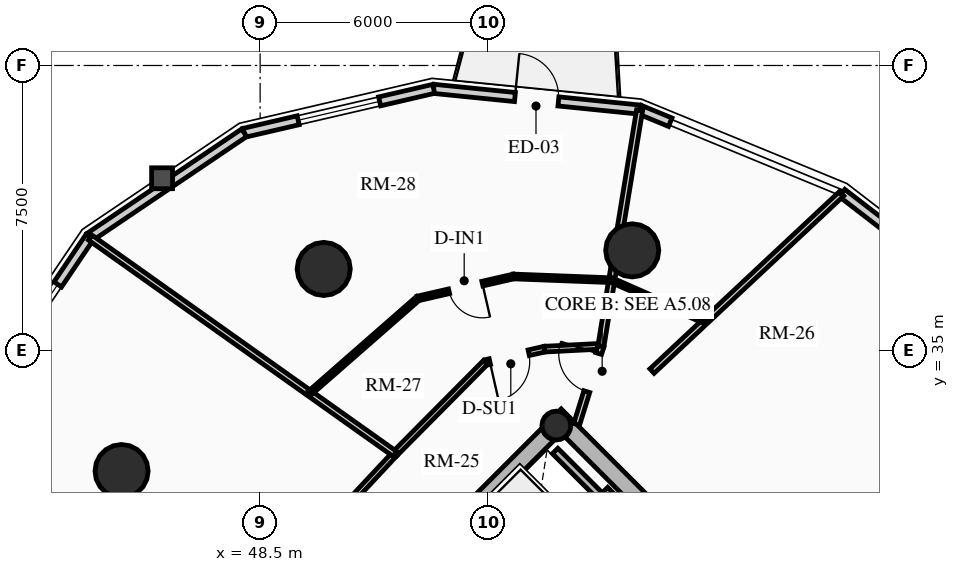
"""IFC4 building model, lengths in metres.
Left out: names, types, materials, properties, quantities, classifications, styles, units other than length and angle.
Written with IfcOpenShell. Run it as: python <this file> out.ifc"""

import sys

from ifc_helpers import new_model, si_unit, direction, frame, frame_2d, origin, origin_2d, place, context, subcontext, project, spatial, rectangle, circle, hollow_circle, extrude, source, transform, mapped, element, fill, save


model = new_model("IFC4")
c1 = context("Model", 3, precision=1e-05, world=origin(), true_north=direction((0.0, 1.0)))
c2 = subcontext(c1, "Body", "Model", "MODEL_VIEW")
j1 = project(units=[si_unit("LENGTHUNIT", "METRE"), si_unit("PLANEANGLEUNIT", "RADIAN")], contexts=[c1])
p1 = place(None, origin())
s1 = spatial("IfcSite", under=j1, at=p1, CompositionType="ELEMENT")
p2 = place(p1, origin())
s2 = spatial("IfcBuilding", under=s1, at=p2, CompositionType="ELEMENT")
p3 = place(p2, frame((0.0, 0.0, 105.07)))
s3 = spatial("IfcBuildingStorey", under=s2, at=p3, CompositionType="ELEMENT", Elevation=105.07)
p4 = place(p3, frame((66.303, 23.263, 0.0), z_axis=(0.0, 0.0, 1.0), x_axis=(-0.707106781187, 0.707106781187, 0.0)))
e1 = element("IfcWall", 1, at=p4, inside=s3, PredefinedType="SHEAR", context=c2, shape_type="SweptSolid", body=[
    extrude(rectangle(XDim=14.2, YDim=0.45, at=frame_2d((7.1, 0.0))), origin(), (0.0, 0.0, 1.0), 2.91),
])
p5 = place(p3, frame((48.856, 25.578, 0.0), z_axis=(0.0, 0.0, 1.0), x_axis=(0.707106781187, 0.707106781187, 0.0)))
e2 = element("IfcWall", 2, at=p5, inside=s3, PredefinedType="SHEAR", context=c2, shape_type="SweptSolid", body=[
    extrude(rectangle(XDim=10.7, YDim=0.45, at=frame_2d((5.35, 0.0))), origin(), (0.0, 0.0, 1.0), 2.91),
])
m1 = source(origin(), c2, "Body", "SweptSolid", [
    extrude(rectangle(XDim=1.5, YDim=2.02, at=frame_2d((0.75, 1.01))), frame((0.0, 0.235, 0.0), z_axis=(0.0, -1.0, 0.0), x_axis=(1.0, 0.0, 0.0)), (0.0, 0.0, 1.0), 0.47),
])
p6 = place(p5, frame((4.6, 0.0, 0.0)))
e3 = element("IfcOpeningElement", 3, at=p6, cuts=e2, PredefinedType="OPENING", context=c2, shape_type="MappedRepresentation", body=[
    mapped(m1, transform((0.0, 0.0, 0.0), x_axis=(1.0, 0.0, 0.0), y_axis=(0.0, 1.0, 0.0), z_axis=(0.0, 0.0, 1.0), scale=1.0)),
])
p7 = place(p3, frame((56.294, 33.024, 0.0), z_axis=(0.0, 0.0, 1.0), x_axis=(0.707106781187, 0.707106781187, 0.0)))
e4 = element("IfcColumn", 4, at=p7, inside=s3, PredefinedType="COLUMN", context=c2, shape_type="SweptSolid", body=[
    extrude(hollow_circle(Radius=0.38, WallThickness=0.032, at=origin_2d()), origin(), (0.0, 0.0, 1.0), 2.91),
])
for number, where, z_axis, x_axis in (
    (5, (58.291, 37.635, 0.0), (0.0, 0.0, 1.0), (1.0, 0.0, 0.0)),
    (6, (50.173, 37.146, 0.0), (0.0, 0.0, 1.0), (1.0, 0.0, 0.0)),
    (7, (44.854, 31.827, 0.0), (0.0, 0.0, 1.0), (1.0, 0.0, 0.0)),
):
    element("IfcColumn", number, at=place(p3, frame(where, z_axis=z_axis, x_axis=x_axis)), inside=s3, PredefinedType="USERDEFINED", context=c2, shape_type="SweptSolid", body=[
        extrude(circle(Radius=0.7, at=origin_2d()), origin(), (0.0, 0.0, 1.0), 2.91),
    ])
p8 = place(p3, frame((63.811, 39.145, 0.0), z_axis=(0.0, 0.0, 1.0), x_axis=(0.791982052206, -0.61054437102, 0.0)))
e8 = element("IfcWall", 8, at=p8, inside=s3, PredefinedType="SOLIDWALL", context=c2, shape_type="SweptSolid", body=[
    extrude(rectangle(XDim=5.942, YDim=0.24, at=frame_2d((2.971, 0.0))), origin(), (0.0, 0.0, 1.0), 2.179),
])
p9 = place(p3, frame((58.487, 41.339, 0.0), z_axis=(0.0, 0.0, 1.0), x_axis=(0.924556017656, -0.381046152345, 0.0)))
e9 = element("IfcWall", 9, at=p9, inside=s3, PredefinedType="SOLIDWALL", context=c2, shape_type="SweptSolid", body=[
    extrude(rectangle(XDim=0.87, YDim=0.24, at=frame_2d((0.435, 0.0))), origin(), (0.0, 0.0, 1.0), 2.179),
])
p10 = place(p3, frame((53.067, 41.885, 0.0), z_axis=(0.0, 0.0, 1.0), x_axis=(0.994971754311, -0.10015591906, 0.0)))
e10 = element("IfcWall", 10, at=p10, inside=s3, PredefinedType="SOLIDWALL", context=c2, shape_type="SweptSolid", body=[
    extrude(rectangle(XDim=5.448, YDim=0.24, at=frame_2d((2.724, 0.0))), origin(), (0.0, 0.0, 1.0), 2.179),
])
m2 = source(origin(), c2, "Body", "SweptSolid", [
    extrude(rectangle(XDim=1.15, YDim=2.005, at=frame_2d((0.575, 1.002))), frame((0.0, 0.13, 0.0), z_axis=(0.0, -1.0, 0.0), x_axis=(1.0, 0.0, 0.0)), (0.0, 0.0, 1.0), 0.26),
])
p11 = place(p10, frame((2.149, 0.0, 0.0)))
e11 = element("IfcOpeningElement", 11, at=p11, cuts=e10, PredefinedType="OPENING", context=c2, shape_type="MappedRepresentation", body=[
    mapped(m2, transform((0.0, 0.0, 0.0), x_axis=(1.0, 0.0, 0.0), y_axis=(0.0, 1.0, 0.0), z_axis=(0.0, 0.0, 1.0), scale=1.0)),
])
p12 = place(p3, frame((48.08, 40.729, 0.0), z_axis=(0.0, 0.0, 1.0), x_axis=(0.974165631126, 0.225834725257, 0.0)))
e12 = element("IfcWall", 12, at=p12, inside=s3, PredefinedType="SOLIDWALL", context=c2, shape_type="SweptSolid", body=[
    extrude(rectangle(XDim=5.119, YDim=0.24, at=frame_2d((2.56, 0.0))), origin(), (0.0, 0.0, 1.0), 2.179),
])
m3 = source(origin(), c2, "Body", "SweptSolid", [
    extrude(rectangle(XDim=2.2, YDim=1.35, at=frame_2d((1.1, 0.675))), frame((0.0, 0.13, 0.0), z_axis=(0.0, -1.0, 0.0), x_axis=(1.0, 0.0, 0.0)), (0.0, 0.0, 1.0), 0.26),
])
p13 = place(p12, frame((1.459, 0.0, 0.65)))
e13 = element("IfcOpeningElement", 13, at=p13, cuts=e12, PredefinedType="OPENING", context=c2, shape_type="MappedRepresentation", body=[
    mapped(m3, transform((0.0, 0.0, 0.0), x_axis=(1.0, 0.0, 0.0), y_axis=(0.0, 1.0, 0.0), z_axis=(0.0, 0.0, 1.0), scale=1.0)),
])
p14 = place(p3, frame((44.015, 37.985, 0.0), z_axis=(0.0, 0.0, 1.0), x_axis=(0.828781148131, 0.559572880421, 0.0)))
e14 = element("IfcWall", 14, at=p14, inside=s3, PredefinedType="SOLIDWALL", context=c2, shape_type="SweptSolid", body=[
    extrude(rectangle(XDim=4.905, YDim=0.24, at=frame_2d((2.452, 0.0))), origin(), (0.0, 0.0, 1.0), 2.179),
])
p15 = place(p3, frame((41.271, 33.92, 0.0), z_axis=(0.0, 0.0, 1.0), x_axis=(0.559572880421, 0.828781148131, 0.0)))
e15 = element("IfcWall", 15, at=p15, inside=s3, PredefinedType="SOLIDWALL", context=c2, shape_type="SweptSolid", body=[
    extrude(rectangle(XDim=4.905, YDim=0.24, at=frame_2d((2.452, 0.0))), origin(), (0.0, 0.0, 1.0), 2.179),
])
m4 = source(origin(), c2, "Body", "SweptSolid", [
    extrude(rectangle(XDim=1.9, YDim=1.35, at=frame_2d((0.95, 0.675))), frame((0.0, 0.13, 0.0), z_axis=(0.0, -1.0, 0.0), x_axis=(1.0, 0.0, 0.0)), (0.0, 0.0, 1.0), 0.26),
])
p16 = place(p15, frame((1.502, 0.0, 0.65)))
e16 = element("IfcOpeningElement", 16, at=p16, cuts=e15, PredefinedType="OPENING", context=c2, shape_type="MappedRepresentation", body=[
    mapped(m4, transform((0.0, 0.0, 0.0), x_axis=(1.0, 0.0, 0.0), y_axis=(0.0, 1.0, 0.0), z_axis=(0.0, 0.0, 1.0), scale=1.0)),
])
p17 = place(p3, frame((55.615, 29.227, 0.0), z_axis=(0.0, 0.0, 1.0), x_axis=(0.707147878904, 0.70706568108, 0.0)))
e17 = element("IfcWall", 17, at=p17, inside=s3, PredefinedType="SHEAR", context=c2, shape_type="SweptSolid", body=[
    extrude(rectangle(XDim=2.97, YDim=0.2, at=frame_2d((1.485, 0.0))), origin(), (0.0, 0.0, 1.0), 2.91),
])
p18 = place(p3, frame((57.419, 31.2, 0.0), z_axis=(0.0, 0.0, 1.0), x_axis=(-0.707032117043, 0.707181437447, 0.0)))
e18 = element("IfcWall", 18, at=p18, inside=s3, PredefinedType="SHEAR", context=c2, shape_type="SweptSolid", body=[
    extrude(rectangle(XDim=1.635, YDim=0.2, at=frame_2d((0.817, 0.0))), origin(), (0.0, 0.0, 1.0), 2.91),
])
p19 = place(p3, frame((57.467, 35.111, 0.0), z_axis=(0.0, 0.0, 1.0), x_axis=(-0.998691757323, -0.051134859488, 0.0)))
e19 = element("IfcWall", 19, at=p19, inside=s3, PredefinedType="PARTITIONING", context=c2, shape_type="SweptSolid", body=[
    extrude(rectangle(XDim=1.485, YDim=0.15, at=frame_2d((0.742, 0.0))), origin(), (0.0, 0.0, 1.0), 2.225),
])
p20 = place(p3, frame((55.984, 35.035, 0.0), z_axis=(0.0, 0.0, 1.0), x_axis=(-0.975290305708, -0.22092718165, 0.0)))
e20 = element("IfcWall", 20, at=p20, inside=s3, PredefinedType="PARTITIONING", context=c2, shape_type="SweptSolid", body=[
    extrude(rectangle(XDim=1.597, YDim=0.15, at=frame_2d((0.798, 0.0))), origin(), (0.0, 0.0, 1.0), 2.225),
])
m5 = source(origin(), c2, "Body", "SweptSolid", [
    extrude(rectangle(XDim=1.05, YDim=2.015, at=frame_2d((0.525, 1.007))), frame((0.0, 0.085, 0.0), z_axis=(0.0, -1.0, 0.0), x_axis=(1.0, 0.0, 0.0)), (0.0, 0.0, 1.0), 0.17),
])
p21 = place(p20, frame((0.427, 0.0, 0.0)))
e21 = element("IfcOpeningElement", 21, at=p21, cuts=e20, PredefinedType="OPENING", context=c2, shape_type="MappedRepresentation", body=[
    mapped(m5, transform((0.0, 0.0, 0.0), x_axis=(1.0, 0.0, 0.0), y_axis=(0.0, 1.0, 0.0), z_axis=(0.0, 0.0, 1.0), scale=1.0)),
])
p22 = place(p3, frame((54.427, 34.683, 0.0), z_axis=(0.0, 0.0, 1.0), x_axis=(-0.704178989986, -0.710022499687, 0.0)))
e22 = element("IfcWall", 22, at=p22, inside=s3, PredefinedType="PARTITIONING", context=c2, shape_type="SweptSolid", body=[
    extrude(rectangle(XDim=3.384, YDim=0.15, at=frame_2d((1.692, 0.0))), origin(), (0.0, 0.0, 1.0), 2.225),
])
p23 = place(p3, frame((52.043, 32.28, 0.0), z_axis=(0.0, 0.0, 1.0), x_axis=(-0.682606081633, -0.730786519661, 0.0)))
e23 = element("IfcWall", 23, at=p23, inside=s3, PredefinedType="PARTITIONING", context=c2, shape_type="SweptSolid", body=[
    extrude(rectangle(XDim=6.527, YDim=0.15, at=frame_2d((3.263, 0.0))), origin(), (0.0, 0.0, 1.0), 2.225),
])
p24 = place(p3, frame((58.812, 34.458, 0.0), z_axis=(0.0, 0.0, 1.0), x_axis=(0.73022196979, 0.683209978584, 0.0)))
e24 = element("IfcWall", 24, at=p24, inside=s3, PredefinedType="PARTITIONING", context=c2, shape_type="SweptSolid", body=[
    extrude(rectangle(XDim=6.834, YDim=0.16, at=frame_2d((3.417, 0.0))), origin(), (0.0, 0.0, 1.0), 2.179),
])
p25 = place(p3, frame((57.467, 35.111, 0.0), z_axis=(0.0, 0.0, 1.0), x_axis=(0.161711214096, 0.98683812413, 0.0)))
e25 = element("IfcWall", 25, at=p25, inside=s3, PredefinedType="PARTITIONING", context=c2, shape_type="SweptSolid", body=[
    extrude(rectangle(XDim=6.291, YDim=0.16, at=frame_2d((3.146, 0.0))), origin(), (0.0, 0.0, 1.0), 2.179),
])
p26 = place(p3, frame((52.043, 32.28, 0.0), z_axis=(0.0, 0.0, 1.0), x_axis=(-0.81534487613, 0.578975589268, 0.0)))
e26 = element("IfcWall", 26, at=p26, inside=s3, PredefinedType="PARTITIONING", context=c2, shape_type="SweptSolid", body=[
    extrude(rectangle(XDim=9.829, YDim=0.16, at=frame_2d((4.915, 0.0))), origin(), (0.0, 0.0, 1.0), 2.179),
])
p27 = place(p3, frame((56.828, 33.056, 0.0), z_axis=(0.0, 0.0, 1.0), x_axis=(0.296730996083, 0.954961107042, 0.0)))
e27 = element("IfcWall", 27, at=p27, inside=s3, PredefinedType="PARTITIONING", context=c2, shape_type="SweptSolid", body=[
    extrude(rectangle(XDim=2.152, YDim=0.16, at=frame_2d((1.076, 0.0))), origin(), (0.0, 0.0, 1.0), 2.225),
])
m6 = source(origin(), c2, "Body", "SweptSolid", [
    extrude(rectangle(XDim=1.05, YDim=2.015, at=frame_2d((0.525, 1.007))), frame((0.0, 0.09, 0.0), z_axis=(0.0, -1.0, 0.0), x_axis=(1.0, 0.0, 0.0)), (0.0, 0.0, 1.0), 0.18),
])
p28 = place(p27, frame((0.902, 0.0, 0.0)))
e28 = element("IfcOpeningElement", 28, at=p28, cuts=e27, PredefinedType="OPENING", context=c2, shape_type="MappedRepresentation", body=[
    mapped(m6, transform((0.0, 0.0, 0.0), x_axis=(1.0, 0.0, 0.0), y_axis=(0.0, 1.0, 0.0), z_axis=(0.0, 0.0, 1.0), scale=1.0)),
])
p29 = place(p3, frame((60.209, 35.766, 0.0), z_axis=(0.0, 0.0, 1.0), x_axis=(-0.914932611268, 0.403606636267, 0.0)))
e29 = element("IfcWall", 29, at=p29, inside=s3, PredefinedType="PARTITIONING", context=c2, shape_type="SweptSolid", body=[
    extrude(rectangle(XDim=2.686, YDim=0.125, at=frame_2d((1.343, 0.0))), origin(), (0.0, 0.0, 1.0), 2.225),
])
p30 = place(p3, frame((57.752, 36.85, 0.0), z_axis=(0.0, 0.0, 1.0), x_axis=(-0.999279468675, 0.037954492291, 0.0)))
e30 = element("IfcWall", 30, at=p30, inside=s3, PredefinedType="PARTITIONING", context=c2, shape_type="SweptSolid", body=[
    extrude(rectangle(XDim=2.586, YDim=0.125, at=frame_2d((1.293, 0.0))), origin(), (0.0, 0.0, 1.0), 2.655),
])
p31 = place(p3, frame((55.168, 36.948, 0.0), z_axis=(0.0, 0.0, 1.0), x_axis=(-0.974677367116, -0.223615808993, 0.0)))
e31 = element("IfcWall", 31, at=p31, inside=s3, PredefinedType="PARTITIONING", context=c2, shape_type="SweptSolid", body=[
    extrude(rectangle(XDim=2.581, YDim=0.125, at=frame_2d((1.291, 0.0))), origin(), (0.0, 0.0, 1.0), 2.225),
])
m7 = source(origin(), c2, "Body", "SweptSolid", [
    extrude(rectangle(XDim=0.9, YDim=2.005, at=frame_2d((0.45, 1.002))), frame((0.0, 0.073, 0.0), z_axis=(0.0, -1.0, 0.0), x_axis=(1.0, 0.0, 0.0)), (0.0, 0.0, 1.0), 0.145),
])
p32 = place(p31, frame((0.841, 0.0, 0.0)))
e32 = element("IfcOpeningElement", 32, at=p32, cuts=e31, PredefinedType="OPENING", context=c2, shape_type="MappedRepresentation", body=[
    mapped(m7, transform((0.0, 0.0, 0.0), x_axis=(1.0, 0.0, 0.0), y_axis=(0.0, 1.0, 0.0), z_axis=(0.0, 0.0, 1.0), scale=1.0)),
])
p33 = place(p3, frame((52.652, 36.371, 0.0), z_axis=(0.0, 0.0, 1.0), x_axis=(-0.752401146533, -0.658705180408, 0.0)))
e33 = element("IfcWall", 33, at=p33, inside=s3, PredefinedType="PARTITIONING", context=c2, shape_type="SweptSolid", body=[
    extrude(rectangle(XDim=3.791, YDim=0.125, at=frame_2d((1.896, 0.0))), origin(), (0.0, 0.0, 1.0), 2.225),
])
m8 = source(origin(), c2, "Body", "SweptSolid", [
    extrude(rectangle(XDim=1.15, YDim=2.005, at=frame_2d((0.575, 1.002))), frame((0.0, 0.025, 0.0), z_axis=(0.0, -1.0, 0.0), x_axis=(1.0, 0.0, 0.0)), (0.0, 0.0, 1.0), 0.05),
])
p34 = place(p11, origin())
e34 = element("IfcDoor", 34, at=p34, inside=s3, OperationType="SINGLE_SWING_LEFT", PredefinedType="DOOR", context=c2, shape_type="MappedRepresentation", body=[
    mapped(m8, transform((0.0, 0.0, 0.0), x_axis=(1.0, 0.0, 0.0), y_axis=(0.0, 1.0, 0.0), z_axis=(0.0, 0.0, 1.0), scale=1.0)),
])
fill(e11, e34)
m9 = source(origin(), c2, "Body", "SweptSolid", [
    extrude(rectangle(XDim=2.2, YDim=1.35, at=frame_2d((1.1, 0.675))), frame((0.0, 0.03, 0.0), z_axis=(0.0, -1.0, 0.0), x_axis=(1.0, 0.0, 0.0)), (0.0, 0.0, 1.0), 0.06),
])
p35 = place(p13, origin())
e35 = element("IfcWindow", 35, at=p35, inside=s3, PartitioningType="DOUBLE_PANEL_VERTICAL", PredefinedType="WINDOW", context=c2, shape_type="MappedRepresentation", body=[
    mapped(m9, transform((0.0, 0.0, 0.0), x_axis=(1.0, 0.0, 0.0), y_axis=(0.0, 1.0, 0.0), z_axis=(0.0, 0.0, 1.0), scale=1.0)),
])
fill(e13, e35)
m10 = source(origin(), c2, "Body", "SweptSolid", [
    extrude(rectangle(XDim=1.9, YDim=1.35, at=frame_2d((0.95, 0.675))), frame((0.0, 0.03, 0.0), z_axis=(0.0, -1.0, 0.0), x_axis=(1.0, 0.0, 0.0)), (0.0, 0.0, 1.0), 0.06),
])
p36 = place(p16, origin())
e36 = element("IfcWindow", 36, at=p36, inside=s3, PartitioningType="DOUBLE_PANEL_VERTICAL", PredefinedType="WINDOW", context=c2, shape_type="MappedRepresentation", body=[
    mapped(m10, transform((0.0, 0.0, 0.0), x_axis=(1.0, 0.0, 0.0), y_axis=(0.0, 1.0, 0.0), z_axis=(0.0, 0.0, 1.0), scale=1.0)),
])
fill(e16, e36)
m11 = source(origin(), c2, "Body", "SweptSolid", [
    extrude(rectangle(XDim=1.05, YDim=2.015, at=frame_2d((0.525, 1.007))), frame((0.0, 0.025, 0.0), z_axis=(0.0, -1.0, 0.0), x_axis=(1.0, 0.0, 0.0)), (0.0, 0.0, 1.0), 0.05),
])
p37 = place(p28, origin())
e37 = element("IfcDoor", 37, at=p37, inside=s3, OperationType="SINGLE_SWING_RIGHT", PredefinedType="DOOR", context=c2, shape_type="MappedRepresentation", body=[
    mapped(m11, transform((0.0, 0.0, 0.0), x_axis=(1.0, 0.0, 0.0), y_axis=(0.0, 1.0, 0.0), z_axis=(0.0, 0.0, 1.0), scale=1.0)),
])
fill(e28, e37)
p38 = place(p21, origin())
e38 = element("IfcDoor", 38, at=p38, inside=s3, OperationType="SINGLE_SWING_RIGHT", PredefinedType="DOOR", context=c2, shape_type="MappedRepresentation", body=[
    mapped(m11, transform((0.0, 0.0, 0.0), x_axis=(1.0, 0.0, 0.0), y_axis=(0.0, 1.0, 0.0), z_axis=(0.0, 0.0, 1.0), scale=1.0)),
])
fill(e21, e38)
m12 = source(origin(), c2, "Body", "SweptSolid", [
    extrude(rectangle(XDim=0.9, YDim=2.005, at=frame_2d((0.45, 1.002))), frame((0.0, 0.025, 0.0), z_axis=(0.0, -1.0, 0.0), x_axis=(1.0, 0.0, 0.0)), (0.0, 0.0, 1.0), 0.05),
])
p39 = place(p32, origin())
e39 = element("IfcDoor", 39, at=p39, inside=s3, OperationType="SINGLE_SWING_LEFT", PredefinedType="DOOR", context=c2, shape_type="MappedRepresentation", body=[
    mapped(m12, transform((0.0, 0.0, 0.0), x_axis=(1.0, 0.0, 0.0), y_axis=(0.0, 1.0, 0.0), z_axis=(0.0, 0.0, 1.0), scale=1.0)),
])
fill(e32, e39)
save(model, sys.argv[1])
